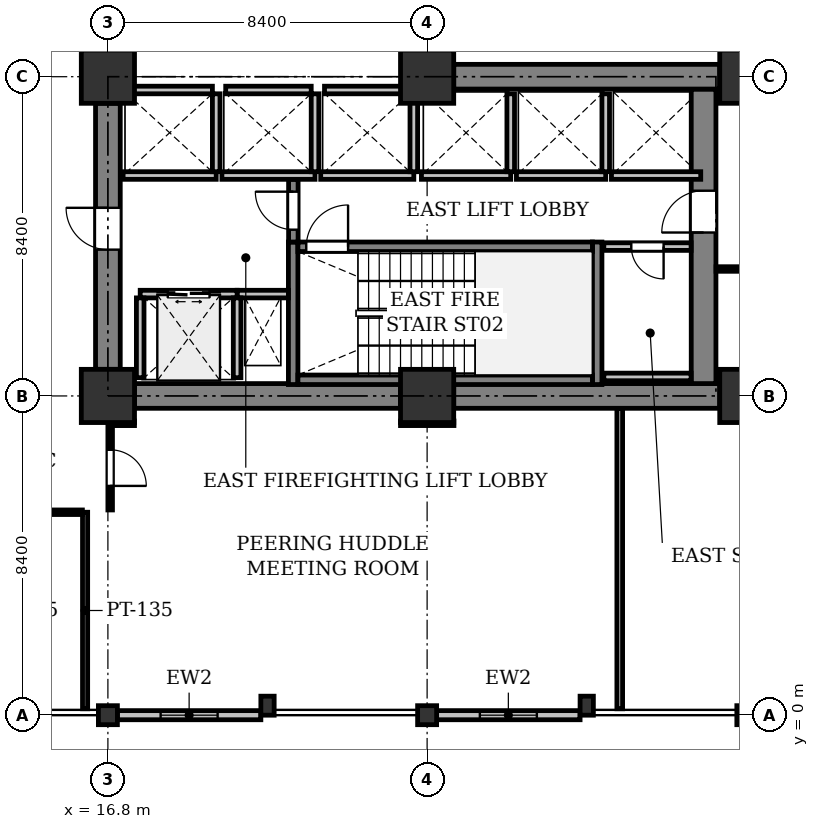
"""IFC4 building model, lengths in metres.
Left out: names, types, materials, properties, quantities, classifications, styles, units other than length and angle.
Written with IfcOpenShell. Run it as: python <this file> out.ifc"""

import sys

from ifc_helpers import new_model, si_unit, direction, frame, frame_2d, origin, origin_2d, place, context, subcontext, project, spatial, rectangle, i_section, extrude, element, fill, save


model = new_model("IFC4")
c1 = context("Model", 3, precision=1e-05, world=origin(), true_north=direction((0.0, 1.0)))
c2 = subcontext(c1, "Body", "Model", "MODEL_VIEW")
j1 = project(units=[si_unit("LENGTHUNIT", "METRE"), si_unit("PLANEANGLEUNIT", "RADIAN")], contexts=[c1])
p1 = place(None, origin())
s1 = spatial("IfcSite", under=j1, at=p1, CompositionType="ELEMENT")
p2 = place(p1, origin())
s2 = spatial("IfcBuilding", under=s1, at=p2, CompositionType="ELEMENT")
p3 = place(p2, frame((0.0, 0.0, 37.4)))
s3 = spatial("IfcBuildingStorey", under=s2, at=p3, CompositionType="ELEMENT", Elevation=37.4)
p4 = place(p3, frame((16.8, 0.0, 0.0), z_axis=(0.0, 0.0, 1.0), x_axis=(1.0, 0.0, 0.0)))
e1 = element("IfcColumn", 1, at=p4, inside=s3, PredefinedType="COLUMN", context=c2, shape_type="SweptSolid", body=[
    extrude(i_section(OverallWidth=0.5, OverallDepth=0.5, WebThickness=0.028, FlangeThickness=0.04, at=origin_2d()), origin(), (0.0, 0.0, 1.0), 4.2),
])
for number, where, z_axis, x_axis in (
    (2, (16.8, 8.4, 0.0), (0.0, 0.0, 1.0), (1.0, 0.0, 0.0)),
    (3, (16.8, 16.8, 0.0), (0.0, 0.0, 1.0), (1.0, 0.0, 0.0)),
):
    element("IfcColumn", number, at=place(p3, frame(where, z_axis=z_axis, x_axis=x_axis)), inside=s3, PredefinedType="COLUMN", context=c2, shape_type="SweptSolid", body=[
        extrude(rectangle(XDim=1.4, YDim=1.4, at=origin_2d()), origin(), (0.0, 0.0, 1.0), 4.2),
    ])
p5 = place(p3, frame((25.2, 0.0, 0.0), z_axis=(0.0, 0.0, 1.0), x_axis=(1.0, 0.0, 0.0)))
e4 = element("IfcColumn", 4, at=p5, inside=s3, PredefinedType="COLUMN", context=c2, shape_type="SweptSolid", body=[
    extrude(i_section(OverallWidth=0.5, OverallDepth=0.5, WebThickness=0.028, FlangeThickness=0.04, at=origin_2d()), origin(), (0.0, 0.0, 1.0), 4.2),
])
for number, where, z_axis, x_axis in (
    (5, (25.2, 8.4, 0.0), (0.0, 0.0, 1.0), (1.0, 0.0, 0.0)),
    (6, (25.2, 16.8, 0.0), (0.0, 0.0, 1.0), (1.0, 0.0, 0.0)),
):
    element("IfcColumn", number, at=place(p3, frame(where, z_axis=z_axis, x_axis=x_axis)), inside=s3, PredefinedType="COLUMN", context=c2, shape_type="SweptSolid", body=[
        extrude(rectangle(XDim=1.4, YDim=1.4, at=origin_2d()), origin(), (0.0, 0.0, 1.0), 4.2),
    ])
p6 = place(p3, frame((33.6, 0.0, 0.0), z_axis=(0.0, 0.0, 1.0), x_axis=(1.0, 0.0, 0.0)))
e7 = element("IfcColumn", 7, at=p6, inside=s3, PredefinedType="COLUMN", context=c2, shape_type="SweptSolid", body=[
    extrude(i_section(OverallWidth=0.5, OverallDepth=0.5, WebThickness=0.028, FlangeThickness=0.04, at=origin_2d()), origin(), (0.0, 0.0, 1.0), 4.2),
])
for number, where, z_axis, x_axis in (
    (8, (33.6, 8.4, 0.0), (0.0, 0.0, 1.0), (1.0, 0.0, 0.0)),
    (9, (33.6, 16.8, 0.0), (0.0, 0.0, 1.0), (1.0, 0.0, 0.0)),
):
    element("IfcColumn", number, at=place(p3, frame(where, z_axis=z_axis, x_axis=x_axis)), inside=s3, PredefinedType="COLUMN", context=c2, shape_type="SweptSolid", body=[
        extrude(rectangle(XDim=1.4, YDim=1.4, at=origin_2d()), origin(), (0.0, 0.0, 1.0), 4.2),
    ])
for number, where, z_axis, x_axis in (
    (10, (21.0, 0.25, 0.0), (0.0, 0.0, 1.0), (1.0, 0.0, 0.0)),
    (11, (29.4, 0.25, 0.0), (0.0, 0.0, 1.0), (1.0, 0.0, 0.0)),
):
    element("IfcColumn", number, at=place(p3, frame(where, z_axis=z_axis, x_axis=x_axis)), inside=s3, PredefinedType="PILASTER", context=c2, shape_type="SweptSolid", body=[
        extrude(rectangle(XDim=0.35, YDim=0.5, at=origin_2d()), origin(), (0.0, 0.0, 1.0), 4.2),
    ])
p7 = place(p3, frame((29.225, 0.0, 0.0), z_axis=(0.0, 0.0, 1.0), x_axis=(-1.0, 0.0, 0.0)))
e12 = element("IfcWall", 12, at=p7, inside=s3, PredefinedType="STANDARD", context=c2, shape_type="SweptSolid", body=[
    extrude(rectangle(XDim=3.775, YDim=0.24, at=frame_2d((1.888, 0.0))), origin(), (0.0, 0.0, 1.0), 3.471),
])
p8 = place(p7, frame((1.137, 0.0, 0.9)))
e13 = element("IfcOpeningElement", 13, at=p8, cuts=e12, PredefinedType="OPENING", context=c2, shape_type="SweptSolid", body=[
    extrude(rectangle(XDim=1.5, YDim=1.6, at=frame_2d((0.75, 0.8))), frame((0.0, 0.13, 0.0), z_axis=(0.0, -1.0, 0.0), x_axis=(1.0, 0.0, 0.0)), (0.0, 0.0, 1.0), 0.26),
])
p9 = place(p3, frame((20.825, 0.0, 0.0), z_axis=(0.0, 0.0, 1.0), x_axis=(-1.0, 0.0, 0.0)))
e14 = element("IfcWall", 14, at=p9, inside=s3, PredefinedType="STANDARD", context=c2, shape_type="SweptSolid", body=[
    extrude(rectangle(XDim=3.775, YDim=0.24, at=frame_2d((1.887, 0.0))), origin(), (0.0, 0.0, 1.0), 3.471),
])
p10 = place(p9, frame((1.137, 0.0, 0.9)))
e15 = element("IfcOpeningElement", 15, at=p10, cuts=e14, PredefinedType="OPENING", context=c2, shape_type="SweptSolid", body=[
    extrude(rectangle(XDim=1.5, YDim=1.6, at=frame_2d((0.75, 0.8))), frame((0.0, 0.13, 0.0), z_axis=(0.0, -1.0, 0.0), x_axis=(1.0, 0.0, 0.0)), (0.0, 0.0, 1.0), 0.26),
])
for number, where, z_axis, x_axis in (
    (16, (17.5, 8.4, 0.0), (0.0, 0.0, 1.0), (1.0, 0.0, 0.0)),
    (17, (25.9, 8.4, 0.0), (0.0, 0.0, 1.0), (1.0, 0.0, 0.0)),
):
    element("IfcWall", number, at=place(p3, frame(where, z_axis=z_axis, x_axis=x_axis)), inside=s3, PredefinedType="SHEAR", context=c2, shape_type="SweptSolid", body=[
        extrude(rectangle(XDim=7.0, YDim=0.65, at=frame_2d((3.5, 0.0))), origin(), (0.0, 0.0, 1.0), 3.925),
    ])
p11 = place(p3, frame((32.475, 8.725, 0.0), z_axis=(0.0, 0.0, 1.0), x_axis=(0.0, 1.0, 0.0)))
e18 = element("IfcWall", 18, at=p11, inside=s3, PredefinedType="SHEAR", context=c2, shape_type="SweptSolid", body=[
    extrude(rectangle(XDim=7.75, YDim=0.65, at=frame_2d((3.875, 0.0))), origin(), (0.0, 0.0, 1.0), 3.925),
])
p12 = place(p11, frame((3.975, 0.0, 0.0)))
e19 = element("IfcOpeningElement", 19, at=p12, cuts=e18, PredefinedType="OPENING", context=c2, shape_type="SweptSolid", body=[
    extrude(rectangle(XDim=1.1, YDim=2.15, at=frame_2d((0.55, 1.075))), frame((0.0, 0.335, 0.0), z_axis=(0.0, -1.0, 0.0), x_axis=(1.0, 0.0, 0.0)), (0.0, 0.0, 1.0), 0.67),
])
p13 = place(p3, frame((16.8, 9.1, 0.0), z_axis=(0.0, 0.0, 1.0), x_axis=(0.0, 1.0, 0.0)))
e20 = element("IfcWall", 20, at=p13, inside=s3, PredefinedType="SHEAR", context=c2, shape_type="SweptSolid", body=[
    extrude(rectangle(XDim=7.0, YDim=0.65, at=frame_2d((3.5, 0.0))), origin(), (0.0, 0.0, 1.0), 3.925),
])
p14 = place(p13, frame((3.15, 0.0, 0.0)))
e21 = element("IfcOpeningElement", 21, at=p14, cuts=e20, PredefinedType="OPENING", context=c2, shape_type="SweptSolid", body=[
    extrude(rectangle(XDim=1.1, YDim=2.15, at=frame_2d((0.55, 1.075))), frame((0.0, 0.335, 0.0), z_axis=(0.0, -1.0, 0.0), x_axis=(1.0, 0.0, 0.0)), (0.0, 0.0, 1.0), 0.67),
])
p15 = place(p3, frame((25.9, 16.8, 0.0), z_axis=(0.0, 0.0, 1.0), x_axis=(1.0, 0.0, 0.0)))
e22 = element("IfcWall", 22, at=p15, inside=s3, PredefinedType="SHEAR", context=c2, shape_type="SweptSolid", body=[
    extrude(rectangle(XDim=7.0, YDim=0.65, at=frame_2d((3.5, 0.0))), origin(), (0.0, 0.0, 1.0), 3.925),
])
for number, where, z_axis, x_axis in (
    (23, (21.675, 8.7, 0.0), (0.0, 0.0, 1.0), (0.0, 1.0, 0.0)),
    (24, (29.675, 8.7, 0.0), (0.0, 0.0, 1.0), (0.0, 1.0, 0.0)),
):
    element("IfcWall", number, at=place(p3, frame(where, z_axis=z_axis, x_axis=x_axis)), inside=s3, PredefinedType="SHEAR", context=c2, shape_type="SweptSolid", body=[
        extrude(rectangle(XDim=3.75, YDim=0.25, at=frame_2d((1.875, 0.0))), origin(), (0.0, 0.0, 1.0), 3.925),
    ])
p16 = place(p3, frame((21.8, 8.825, 0.0), z_axis=(0.0, 0.0, 1.0), x_axis=(1.0, 0.0, 0.0)))
e25 = element("IfcWall", 25, at=p16, inside=s3, PredefinedType="SHEAR", context=c2, shape_type="SweptSolid", body=[
    extrude(rectangle(XDim=7.75, YDim=0.25, at=frame_2d((3.875, 0.0))), origin(), (0.0, 0.0, 1.0), 3.925),
])
p17 = place(p3, frame((21.8, 12.325, 0.0), z_axis=(0.0, 0.0, 1.0), x_axis=(1.0, 0.0, 0.0)))
e26 = element("IfcWall", 26, at=p17, inside=s3, PredefinedType="SHEAR", context=c2, shape_type="SweptSolid", body=[
    extrude(rectangle(XDim=7.75, YDim=0.25, at=frame_2d((3.875, 0.0))), origin(), (0.0, 0.0, 1.0), 3.925),
])
p18 = place(p17, frame((0.22, 0.0, 0.0)))
e27 = element("IfcOpeningElement", 27, at=p18, cuts=e26, PredefinedType="OPENING", context=c2, shape_type="SweptSolid", body=[
    extrude(rectangle(XDim=1.1, YDim=2.15, at=frame_2d((0.55, 1.075))), frame((0.0, 0.135, 0.0), z_axis=(0.0, -1.0, 0.0), x_axis=(1.0, 0.0, 0.0)), (0.0, 0.0, 1.0), 0.27),
])
p19 = place(p3, frame((20.2, 11.08, 0.0), z_axis=(0.0, 0.0, 1.0), x_axis=(1.0, 0.0, 0.0)))
e28 = element("IfcWall", 28, at=p19, inside=s3, PredefinedType="PARTITIONING", context=c2, shape_type="SweptSolid", body=[
    extrude(rectangle(XDim=1.35, YDim=0.2, at=frame_2d((0.675, 0.0))), origin(), (0.0, 0.0, 1.0), 3.925),
])
p20 = place(p3, frame((21.68, 12.45, 0.0), z_axis=(0.0, 0.0, 1.0), x_axis=(0.0, 1.0, 0.0)))
e29 = element("IfcWall", 29, at=p20, inside=s3, PredefinedType="SHEAR", context=c2, shape_type="SweptSolid", body=[
    extrude(rectangle(XDim=1.65, YDim=0.25, at=frame_2d((0.825, 0.0))), origin(), (0.0, 0.0, 1.0), 3.925),
])
p21 = place(p20, frame((0.325, 0.0, 0.0)))
e30 = element("IfcOpeningElement", 30, at=p21, cuts=e29, PredefinedType="OPENING", context=c2, shape_type="SweptSolid", body=[
    extrude(rectangle(XDim=1.0, YDim=2.15, at=frame_2d((0.5, 1.075))), frame((0.0, 0.135, 0.0), z_axis=(0.0, -1.0, 0.0), x_axis=(1.0, 0.0, 0.0)), (0.0, 0.0, 1.0), 0.27),
])
p22 = place(p3, frame((17.65, 11.08, 0.0), z_axis=(0.0, 0.0, 1.0), x_axis=(1.0, 0.0, 0.0)))
e31 = element("IfcWall", 31, at=p22, inside=s3, PredefinedType="PARTITIONING", context=c2, shape_type="SweptSolid", body=[
    extrude(rectangle(XDim=2.55, YDim=0.2, at=frame_2d((1.275, 0.0))), origin(), (0.0, 0.0, 1.0), 3.925),
])
p23 = place(p22, frame((0.725, 0.0, 0.0)))
e32 = element("IfcOpeningElement", 32, at=p23, cuts=e31, PredefinedType="OPENING", context=c2, shape_type="SweptSolid", body=[
    extrude(rectangle(XDim=1.1, YDim=2.2, at=frame_2d((0.55, 1.1))), frame((0.0, 0.11, 0.0), z_axis=(0.0, -1.0, 0.0), x_axis=(1.0, 0.0, 0.0)), (0.0, 0.0, 1.0), 0.22),
])
for number, where, z_axis, x_axis in (
    (33, (20.2, 8.88, 0.0), (0.0, 0.0, 1.0), (0.0, 1.0, 0.0)),
    (34, (17.65, 8.88, 0.0), (0.0, 0.0, 1.0), (0.0, 1.0, 0.0)),
):
    element("IfcWall", number, at=place(p3, frame(where, z_axis=z_axis, x_axis=x_axis)), inside=s3, PredefinedType="PARTITIONING", context=c2, shape_type="SweptSolid", body=[
        extrude(rectangle(XDim=2.1, YDim=0.2, at=frame_2d((1.05, 0.0))), origin(), (0.0, 0.0, 1.0), 3.925),
    ])
p24 = place(p3, frame((17.2, 14.2, 0.0), z_axis=(0.0, 0.0, 1.0), x_axis=(1.0, 0.0, 0.0)))
e35 = element("IfcWall", 35, at=p24, inside=s3, PredefinedType="PARTITIONING", context=c2, shape_type="SweptSolid", body=[
    extrude(rectangle(XDim=2.45, YDim=0.2, at=frame_2d((1.225, 0.0))), origin(), (0.0, 0.0, 1.0), 3.925),
])
p25 = place(p3, frame((19.65, 14.3, 0.0), z_axis=(0.0, 0.0, 1.0), x_axis=(0.0, 1.0, 0.0)))
e36 = element("IfcWall", 36, at=p25, inside=s3, PredefinedType="PARTITIONING", context=c2, shape_type="SweptSolid", body=[
    extrude(rectangle(XDim=2.05, YDim=0.2, at=frame_2d((1.025, 0.0))), origin(), (0.0, 0.0, 1.0), 3.925),
])
p26 = place(p3, frame((17.3, 16.45, 0.0), z_axis=(0.0, 0.0, 1.0), x_axis=(1.0, 0.0, 0.0)))
e37 = element("IfcWall", 37, at=p26, inside=s3, PredefinedType="PARTITIONING", context=c2, shape_type="SweptSolid", body=[
    extrude(rectangle(XDim=2.25, YDim=0.2, at=frame_2d((1.125, 0.0))), origin(), (0.0, 0.0, 1.0), 3.925),
])
p27 = place(p3, frame((19.8, 14.2, 0.0), z_axis=(0.0, 0.0, 1.0), x_axis=(1.0, 0.0, 0.0)))
e38 = element("IfcWall", 38, at=p27, inside=s3, PredefinedType="PARTITIONING", context=c2, shape_type="SweptSolid", body=[
    extrude(rectangle(XDim=2.45, YDim=0.2, at=frame_2d((1.225, 0.0))), origin(), (0.0, 0.0, 1.0), 3.925),
])
p28 = place(p3, frame((22.25, 14.3, 0.0), z_axis=(0.0, 0.0, 1.0), x_axis=(0.0, 1.0, 0.0)))
e39 = element("IfcWall", 39, at=p28, inside=s3, PredefinedType="PARTITIONING", context=c2, shape_type="SweptSolid", body=[
    extrude(rectangle(XDim=2.05, YDim=0.2, at=frame_2d((1.025, 0.0))), origin(), (0.0, 0.0, 1.0), 3.925),
])
p29 = place(p3, frame((19.9, 16.45, 0.0), z_axis=(0.0, 0.0, 1.0), x_axis=(1.0, 0.0, 0.0)))
e40 = element("IfcWall", 40, at=p29, inside=s3, PredefinedType="PARTITIONING", context=c2, shape_type="SweptSolid", body=[
    extrude(rectangle(XDim=2.25, YDim=0.2, at=frame_2d((1.125, 0.0))), origin(), (0.0, 0.0, 1.0), 3.925),
])
p30 = place(p3, frame((22.4, 14.2, 0.0), z_axis=(0.0, 0.0, 1.0), x_axis=(1.0, 0.0, 0.0)))
e41 = element("IfcWall", 41, at=p30, inside=s3, PredefinedType="PARTITIONING", context=c2, shape_type="SweptSolid", body=[
    extrude(rectangle(XDim=2.45, YDim=0.2, at=frame_2d((1.225, 0.0))), origin(), (0.0, 0.0, 1.0), 3.925),
])
p31 = place(p3, frame((24.85, 14.3, 0.0), z_axis=(0.0, 0.0, 1.0), x_axis=(0.0, 1.0, 0.0)))
e42 = element("IfcWall", 42, at=p31, inside=s3, PredefinedType="PARTITIONING", context=c2, shape_type="SweptSolid", body=[
    extrude(rectangle(XDim=2.05, YDim=0.2, at=frame_2d((1.025, 0.0))), origin(), (0.0, 0.0, 1.0), 3.925),
])
p32 = place(p3, frame((22.5, 16.45, 0.0), z_axis=(0.0, 0.0, 1.0), x_axis=(1.0, 0.0, 0.0)))
e43 = element("IfcWall", 43, at=p32, inside=s3, PredefinedType="PARTITIONING", context=c2, shape_type="SweptSolid", body=[
    extrude(rectangle(XDim=2.25, YDim=0.2, at=frame_2d((1.125, 0.0))), origin(), (0.0, 0.0, 1.0), 3.925),
])
p33 = place(p3, frame((25.05, 14.2, 0.0), z_axis=(0.0, 0.0, 1.0), x_axis=(1.0, 0.0, 0.0)))
e44 = element("IfcWall", 44, at=p33, inside=s3, PredefinedType="PARTITIONING", context=c2, shape_type="SweptSolid", body=[
    extrude(rectangle(XDim=2.35, YDim=0.2, at=frame_2d((1.175, 0.0))), origin(), (0.0, 0.0, 1.0), 3.925),
])
p34 = place(p3, frame((27.4, 14.3, 0.0), z_axis=(0.0, 0.0, 1.0), x_axis=(0.0, 1.0, 0.0)))
e45 = element("IfcWall", 45, at=p34, inside=s3, PredefinedType="PARTITIONING", context=c2, shape_type="SweptSolid", body=[
    extrude(rectangle(XDim=2.05, YDim=0.2, at=frame_2d((1.025, 0.0))), origin(), (0.0, 0.0, 1.0), 3.925),
])
p35 = place(p3, frame((27.55, 14.2, 0.0), z_axis=(0.0, 0.0, 1.0), x_axis=(1.0, 0.0, 0.0)))
e46 = element("IfcWall", 46, at=p35, inside=s3, PredefinedType="PARTITIONING", context=c2, shape_type="SweptSolid", body=[
    extrude(rectangle(XDim=2.35, YDim=0.2, at=frame_2d((1.175, 0.0))), origin(), (0.0, 0.0, 1.0), 3.925),
])
p36 = place(p3, frame((29.9, 14.3, 0.0), z_axis=(0.0, 0.0, 1.0), x_axis=(0.0, 1.0, 0.0)))
e47 = element("IfcWall", 47, at=p36, inside=s3, PredefinedType="PARTITIONING", context=c2, shape_type="SweptSolid", body=[
    extrude(rectangle(XDim=2.05, YDim=0.2, at=frame_2d((1.025, 0.0))), origin(), (0.0, 0.0, 1.0), 3.925),
])
p37 = place(p3, frame((30.05, 14.2, 0.0), z_axis=(0.0, 0.0, 1.0), x_axis=(1.0, 0.0, 0.0)))
e48 = element("IfcWall", 48, at=p37, inside=s3, PredefinedType="PARTITIONING", context=c2, shape_type="SweptSolid", body=[
    extrude(rectangle(XDim=2.35, YDim=0.2, at=frame_2d((1.175, 0.0))), origin(), (0.0, 0.0, 1.0), 3.925),
])
p38 = place(p3, frame((32.146, 12.33, 0.0), z_axis=(0.0, 0.0, 1.0), x_axis=(-1.0, 0.0, 0.0)))
e49 = element("IfcWall", 49, at=p38, inside=s3, PredefinedType="PARTITIONING", context=c2, shape_type="SweptSolid", body=[
    extrude(rectangle(XDim=2.296, YDim=0.2, at=frame_2d((1.148, 0.0))), origin(), (0.0, 0.0, 1.0), 3.925),
])
p39 = place(p38, frame((0.723, 0.0, 0.0)))
e50 = element("IfcOpeningElement", 50, at=p39, cuts=e49, PredefinedType="OPENING", context=c2, shape_type="SweptSolid", body=[
    extrude(rectangle(XDim=0.85, YDim=2.15, at=frame_2d((0.425, 1.075))), frame((0.0, 0.11, 0.0), z_axis=(0.0, -1.0, 0.0), x_axis=(1.0, 0.0, 0.0)), (0.0, 0.0, 1.0), 0.22),
])
p40 = place(p3, frame((29.85, 8.9, 0.0), z_axis=(0.0, 0.0, 1.0), x_axis=(1.0, 0.0, 0.0)))
e51 = element("IfcWall", 51, at=p40, inside=s3, PredefinedType="PARTITIONING", context=c2, shape_type="SweptSolid", body=[
    extrude(rectangle(XDim=2.296, YDim=0.2, at=frame_2d((1.148, 0.0))), origin(), (0.0, 0.0, 1.0), 3.925),
])
p41 = place(p3, frame((16.2, 0.169, 0.0), z_axis=(0.0, 0.0, 1.0), x_axis=(0.0, 1.0, 0.0)))
e52 = element("IfcWall", 52, at=p41, inside=s3, PredefinedType="PARTITIONING", context=c2, shape_type="SweptSolid", body=[
    extrude(rectangle(XDim=5.171, YDim=0.135, at=frame_2d((2.585, 0.0))), origin(), (0.0, 0.0, 1.0), 3.925),
])
p42 = place(p3, frame((16.128, 5.34, 0.0), z_axis=(0.0, 0.0, 1.0), x_axis=(-1.0, 0.0, 0.0)))
e53 = element("IfcWall", 53, at=p42, inside=s3, PredefinedType="PARTITIONING", context=c2, shape_type="SweptSolid", body=[
    extrude(rectangle(XDim=2.857, YDim=0.12, at=frame_2d((1.428, 0.0))), origin(), (0.0, 0.0, 1.0), 3.925),
])
p43 = place(p42, frame((0.969, 0.0, 0.0)))
e54 = element("IfcOpeningElement", 54, at=p43, cuts=e53, PredefinedType="OPENING", context=c2, shape_type="SweptSolid", body=[
    extrude(rectangle(XDim=0.92, YDim=2.1, at=frame_2d((0.46, 1.05))), frame((0.0, 0.07, 0.0), z_axis=(0.0, -1.0, 0.0), x_axis=(1.0, 0.0, 0.0)), (0.0, 0.0, 1.0), 0.14),
])
p44 = place(p3, frame((30.269, 0.169, 0.0), z_axis=(0.0, 0.0, 1.0), x_axis=(0.0, 1.0, 0.0)))
e55 = element("IfcWall", 55, at=p44, inside=s3, PredefinedType="PARTITIONING", context=c2, shape_type="SweptSolid", body=[
    extrude(rectangle(XDim=7.902, YDim=0.15, at=frame_2d((3.951, 0.0))), origin(), (0.0, 0.0, 1.0), 3.925),
])
p45 = place(p3, frame((25.906, 7.681, 0.0), z_axis=(0.0, 0.0, 1.0), x_axis=(-0.999999758706, -0.000694685487, 0.0)))
e56 = element("IfcWall", 56, at=p45, inside=s3, PredefinedType="PARTITIONING", context=c2, shape_type="SweptSolid", body=[
    extrude(rectangle(XDim=1.406, YDim=0.12, at=frame_2d((0.703, 0.0))), origin(), (0.0, 0.0, 1.0), 3.323),
])
p46 = place(p3, frame((17.5, 7.68, 0.0), z_axis=(0.0, 0.0, 1.0), x_axis=(-1.0, 0.0, 0.0)))
e57 = element("IfcWall", 57, at=p46, inside=s3, PredefinedType="PARTITIONING", context=c2, shape_type="SweptSolid", body=[
    extrude(rectangle(XDim=0.64, YDim=0.12, at=frame_2d((0.32, 0.0))), origin(), (0.0, 0.0, 1.0), 3.323),
])
p47 = place(p3, frame((16.86, 7.616, 0.0), z_axis=(0.0, 0.0, 1.0), x_axis=(0.0, -1.0, 0.0)))
e58 = element("IfcWall", 58, at=p47, inside=s3, PredefinedType="PARTITIONING", context=c2, shape_type="SweptSolid", body=[
    extrude(rectangle(XDim=2.216, YDim=0.12, at=frame_2d((1.108, 0.0))), origin(), (0.0, 0.0, 1.0), 3.323),
])
p48 = place(p47, frame((0.633, 0.0, 0.0)))
e59 = element("IfcOpeningElement", 59, at=p48, cuts=e58, PredefinedType="OPENING", context=c2, shape_type="SweptSolid", body=[
    extrude(rectangle(XDim=0.95, YDim=2.15, at=frame_2d((0.475, 1.075))), frame((0.0, 0.07, 0.0), z_axis=(0.0, -1.0, 0.0), x_axis=(1.0, 0.0, 0.0)), (0.0, 0.0, 1.0), 0.14),
])
p49 = place(p3, frame((34.261, 11.74, 0.0), z_axis=(0.0, 0.0, 1.0), x_axis=(-1.0, 0.0, 0.0)))
e60 = element("IfcWall", 60, at=p49, inside=s3, PredefinedType="PARTITIONING", context=c2, shape_type="SweptSolid", body=[
    extrude(rectangle(XDim=1.457, YDim=0.12, at=frame_2d((0.729, 0.0))), origin(), (0.0, 0.0, 1.0), 3.323),
])
p50 = place(p8, origin())
e61 = element("IfcWindow", 61, at=p50, inside=s3, PartitioningType="SINGLE_PANEL", PredefinedType="WINDOW", context=c2, shape_type="SweptSolid", body=[
    extrude(rectangle(XDim=1.5, YDim=1.6, at=frame_2d((0.75, 0.8))), frame((0.0, 0.03, 0.0), z_axis=(0.0, -1.0, 0.0), x_axis=(1.0, 0.0, 0.0)), (0.0, 0.0, 1.0), 0.06),
])
fill(e13, e61)
p51 = place(p10, origin())
e62 = element("IfcWindow", 62, at=p51, inside=s3, PartitioningType="SINGLE_PANEL", PredefinedType="WINDOW", context=c2, shape_type="SweptSolid", body=[
    extrude(rectangle(XDim=1.5, YDim=1.6, at=frame_2d((0.75, 0.8))), frame((0.0, 0.03, 0.0), z_axis=(0.0, -1.0, 0.0), x_axis=(1.0, 0.0, 0.0)), (0.0, 0.0, 1.0), 0.06),
])
fill(e15, e62)
p52 = place(p12, origin())
e63 = element("IfcDoor", 63, at=p52, inside=s3, OperationType="SINGLE_SWING_LEFT", PredefinedType="DOOR", context=c2, shape_type="SweptSolid", body=[
    extrude(rectangle(XDim=1.1, YDim=2.15, at=frame_2d((0.55, 1.075))), frame((0.0, 0.025, 0.0), z_axis=(0.0, -1.0, 0.0), x_axis=(1.0, 0.0, 0.0)), (0.0, 0.0, 1.0), 0.05),
])
fill(e19, e63)
p53 = place(p14, origin())
e64 = element("IfcDoor", 64, at=p53, inside=s3, OperationType="SINGLE_SWING_RIGHT", PredefinedType="DOOR", context=c2, shape_type="SweptSolid", body=[
    extrude(rectangle(XDim=1.1, YDim=2.15, at=frame_2d((0.55, 1.075))), frame((0.0, 0.025, 0.0), z_axis=(0.0, -1.0, 0.0), x_axis=(1.0, 0.0, 0.0)), (0.0, 0.0, 1.0), 0.05),
])
fill(e21, e64)
p54 = place(p18, origin())
e65 = element("IfcDoor", 65, at=p54, inside=s3, OperationType="SINGLE_SWING_RIGHT", PredefinedType="DOOR", context=c2, shape_type="SweptSolid", body=[
    extrude(rectangle(XDim=1.1, YDim=2.15, at=frame_2d((0.55, 1.075))), frame((0.0, 0.025, 0.0), z_axis=(0.0, -1.0, 0.0), x_axis=(1.0, 0.0, 0.0)), (0.0, 0.0, 1.0), 0.05),
])
fill(e27, e65)
p55 = place(p21, origin())
e66 = element("IfcDoor", 66, at=p55, inside=s3, OperationType="SINGLE_SWING_RIGHT", PredefinedType="DOOR", context=c2, shape_type="SweptSolid", body=[
    extrude(rectangle(XDim=1.0, YDim=2.15, at=frame_2d((0.5, 1.075))), frame((0.0, 0.025, 0.0), z_axis=(0.0, -1.0, 0.0), x_axis=(1.0, 0.0, 0.0)), (0.0, 0.0, 1.0), 0.05),
])
fill(e30, e66)
p56 = place(p23, origin())
e67 = element("IfcDoor", 67, at=p56, inside=s3, OperationType="DOUBLE_DOOR_SLIDING", PredefinedType="DOOR", context=c2, shape_type="SweptSolid", body=[
    extrude(rectangle(XDim=1.1, YDim=2.2, at=frame_2d((0.55, 1.1))), frame((0.0, 0.025, 0.0), z_axis=(0.0, -1.0, 0.0), x_axis=(1.0, 0.0, 0.0)), (0.0, 0.0, 1.0), 0.05),
])
fill(e32, e67)
p57 = place(p39, origin())
e68 = element("IfcDoor", 68, at=p57, inside=s3, OperationType="SINGLE_SWING_LEFT", PredefinedType="DOOR", context=c2, shape_type="SweptSolid", body=[
    extrude(rectangle(XDim=0.85, YDim=2.15, at=frame_2d((0.425, 1.075))), frame((0.0, 0.025, 0.0), z_axis=(0.0, -1.0, 0.0), x_axis=(1.0, 0.0, 0.0)), (0.0, 0.0, 1.0), 0.05),
])
fill(e50, e68)
p58 = place(p48, origin())
e69 = element("IfcDoor", 69, at=p58, inside=s3, OperationType="SINGLE_SWING_RIGHT", PredefinedType="DOOR", context=c2, shape_type="SweptSolid", body=[
    extrude(rectangle(XDim=0.95, YDim=2.15, at=frame_2d((0.475, 1.075))), frame((0.0, 0.025, 0.0), z_axis=(0.0, -1.0, 0.0), x_axis=(1.0, 0.0, 0.0)), (0.0, 0.0, 1.0), 0.05),
])
fill(e59, e69)
save(model, sys.argv[1])
